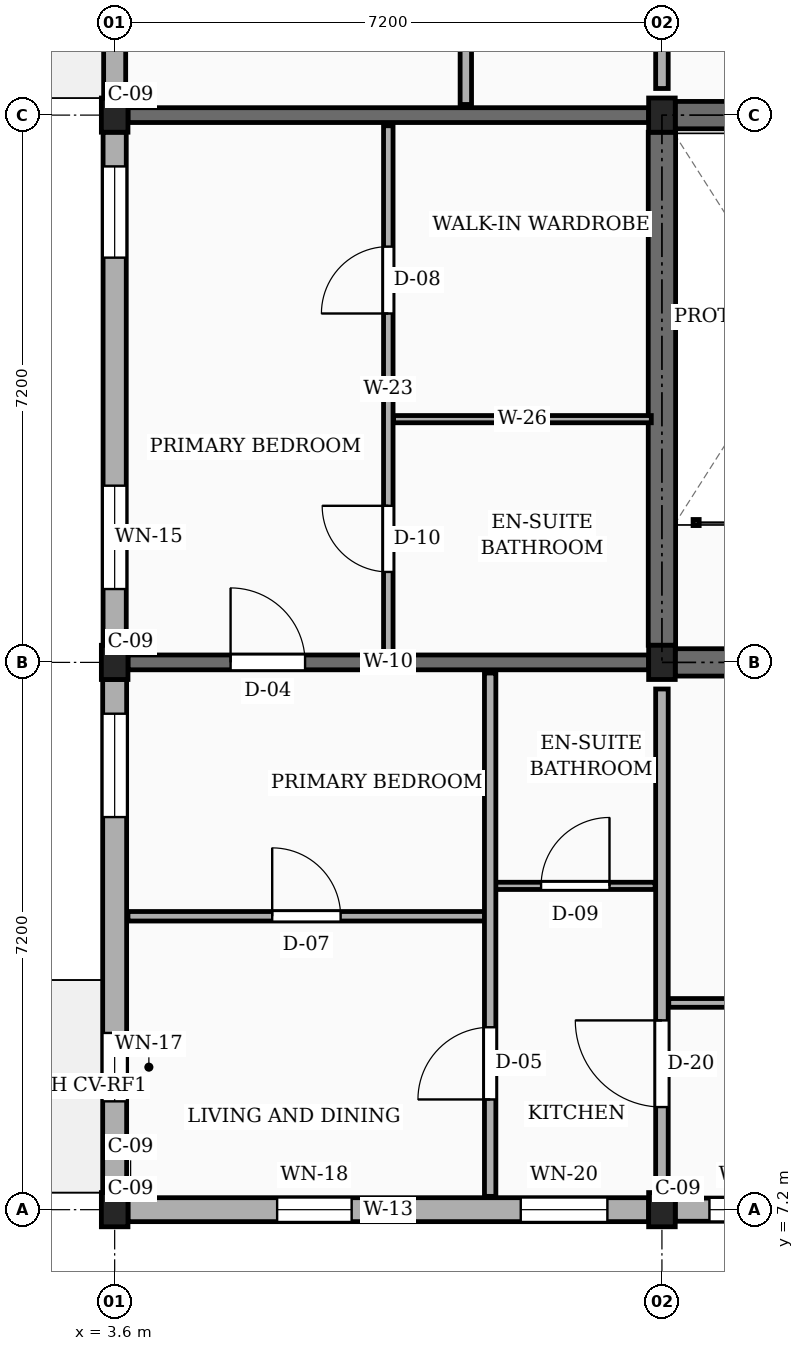
"""IFC4 building model, lengths in metres.
Left out: names, types, materials, properties, quantities, classifications, styles, units other than length and angle.
Written with IfcOpenShell. Run it as: python <this file> out.ifc"""

import sys

from ifc_helpers import new_model, si_unit, direction, frame, frame_2d, origin, origin_2d, place, context, subcontext, project, spatial, rectangle, extrude, element, fill, save


model = new_model("IFC4")
c1 = context("Model", 3, precision=1e-05, world=origin(), true_north=direction((0.0, 1.0)))
c2 = subcontext(c1, "Body", "Model", "MODEL_VIEW")
j1 = project(units=[si_unit("LENGTHUNIT", "METRE"), si_unit("PLANEANGLEUNIT", "RADIAN")], contexts=[c1])
p1 = place(None, origin())
s1 = spatial("IfcSite", under=j1, at=p1, CompositionType="ELEMENT")
p2 = place(p1, origin())
s2 = spatial("IfcBuilding", under=s1, at=p2, CompositionType="ELEMENT")
p3 = place(p2, frame((0.0, 0.0, 48.6)))
s3 = spatial("IfcBuildingStorey", under=s2, at=p3, CompositionType="ELEMENT", Elevation=48.6)
for number, where, z_axis, x_axis in (
    (1, (3.6, 7.2, 0.0), (0.0, 0.0, 1.0), (1.0, 0.0, 0.0)),
    (2, (3.6, 14.4, 0.0), (0.0, 0.0, 1.0), (1.0, 0.0, 0.0)),
    (3, (3.6, 21.6, 0.0), (0.0, 0.0, 1.0), (1.0, 0.0, 0.0)),
    (4, (10.8, 7.2, 0.0), (0.0, 0.0, 1.0), (1.0, 0.0, 0.0)),
    (5, (10.8, 14.4, 0.0), (0.0, 0.0, 1.0), (1.0, 0.0, 0.0)),
    (6, (10.8, 21.6, 0.0), (0.0, 0.0, 1.0), (1.0, 0.0, 0.0)),
):
    element("IfcColumn", number, at=place(p3, frame(where, z_axis=z_axis, x_axis=x_axis)), inside=s3, PredefinedType="COLUMN", context=c2, shape_type="SweptSolid", body=[
        extrude(rectangle(XDim=0.35, YDim=0.45, at=origin_2d()), origin(), (0.0, 0.0, 1.0), 3.15),
    ])
p4 = place(p3, frame((3.775, 14.4, 0.0), z_axis=(0.0, 0.0, 1.0), x_axis=(1.0, 0.0, 0.0)))
e7 = element("IfcWall", 7, at=p4, inside=s3, PredefinedType="SOLIDWALL", context=c2, shape_type="SweptSolid", body=[
    extrude(rectangle(XDim=6.85, YDim=0.195, at=frame_2d((3.425, 0.0))), origin(), (0.0, 0.0, 1.0), 2.22),
])
p5 = place(p4, frame((1.35, 0.0, 0.0)))
e8 = element("IfcOpeningElement", 8, at=p5, cuts=e7, PredefinedType="OPENING", context=c2, shape_type="SweptSolid", body=[
    extrude(rectangle(XDim=0.98, YDim=2.12, at=frame_2d((0.49, 1.06))), frame((0.0, 0.107, 0.0), z_axis=(0.0, -1.0, 0.0), x_axis=(1.0, 0.0, 0.0)), (0.0, 0.0, 1.0), 0.215),
])
p6 = place(p3, frame((3.775, 21.6, 0.0), z_axis=(0.0, 0.0, 1.0), x_axis=(1.0, 0.0, 0.0)))
e9 = element("IfcWall", 9, at=p6, inside=s3, PredefinedType="SOLIDWALL", context=c2, shape_type="SweptSolid", body=[
    extrude(rectangle(XDim=6.85, YDim=0.195, at=frame_2d((3.425, 0.0))), origin(), (0.0, 0.0, 1.0), 2.22),
])
p7 = place(p3, frame((3.775, 7.2, 0.0), z_axis=(0.0, 0.0, 1.0), x_axis=(1.0, 0.0, 0.0)))
e10 = element("IfcWall", 10, at=p7, inside=s3, PredefinedType="SOLIDWALL", context=c2, shape_type="SweptSolid", body=[
    extrude(rectangle(XDim=6.85, YDim=0.315, at=frame_2d((3.425, 0.0))), origin(), (0.0, 0.0, 1.0), 2.46),
])
p8 = place(p7, frame((1.962, 0.0, 0.78)))
e11 = element("IfcOpeningElement", 11, at=p8, cuts=e10, PredefinedType="OPENING", context=c2, shape_type="SweptSolid", body=[
    extrude(rectangle(XDim=0.98, YDim=1.36, at=frame_2d((0.49, 0.68))), frame((0.0, 0.167, 0.0), z_axis=(0.0, -1.0, 0.0), x_axis=(1.0, 0.0, 0.0)), (0.0, 0.0, 1.0), 0.335),
])
p9 = place(p7, frame((5.167, 0.0, 0.78)))
e12 = element("IfcOpeningElement", 12, at=p9, cuts=e10, PredefinedType="OPENING", context=c2, shape_type="SweptSolid", body=[
    extrude(rectangle(XDim=1.14, YDim=1.36, at=frame_2d((0.57, 0.68))), frame((0.0, 0.167, 0.0), z_axis=(0.0, -1.0, 0.0), x_axis=(1.0, 0.0, 0.0)), (0.0, 0.0, 1.0), 0.335),
])
p10 = place(p3, frame((10.975, 7.2, 0.0), z_axis=(0.0, 0.0, 1.0), x_axis=(1.0, 0.0, 0.0)))
e13 = element("IfcWall", 13, at=p10, inside=s3, PredefinedType="SOLIDWALL", context=c2, shape_type="SweptSolid", body=[
    extrude(rectangle(XDim=6.85, YDim=0.305, at=frame_2d((3.425, 0.0))), origin(), (0.0, 0.0, 1.0), 2.46),
])
p11 = place(p10, frame((0.45, 0.0, 0.78)))
e14 = element("IfcOpeningElement", 14, at=p11, cuts=e13, PredefinedType="OPENING", context=c2, shape_type="SweptSolid", body=[
    extrude(rectangle(XDim=1.14, YDim=1.36, at=frame_2d((0.57, 0.68))), frame((0.0, 0.163, 0.0), z_axis=(0.0, -1.0, 0.0), x_axis=(1.0, 0.0, 0.0)), (0.0, 0.0, 1.0), 0.325),
])
p12 = place(p10, frame((4.65, 0.0, 0.78)))
e15 = element("IfcOpeningElement", 15, at=p12, cuts=e13, PredefinedType="OPENING", context=c2, shape_type="SweptSolid", body=[
    extrude(rectangle(XDim=1.3, YDim=1.36, at=frame_2d((0.65, 0.68))), frame((0.0, 0.163, 0.0), z_axis=(0.0, -1.0, 0.0), x_axis=(1.0, 0.0, 0.0)), (0.0, 0.0, 1.0), 0.325),
])
p13 = place(p3, frame((3.6, 28.575, 0.0), z_axis=(0.0, 0.0, 1.0), x_axis=(0.0, -1.0, 0.0)))
e16 = element("IfcWall", 16, at=p13, inside=s3, PredefinedType="SOLIDWALL", context=c2, shape_type="SweptSolid", body=[
    extrude(rectangle(XDim=6.75, YDim=0.29, at=frame_2d((3.375, 0.0))), origin(), (0.0, 0.0, 1.0), 2.46),
])
p14 = place(p13, frame((0.45, 0.0, 0.78)))
e17 = element("IfcOpeningElement", 17, at=p14, cuts=e16, PredefinedType="OPENING", context=c2, shape_type="SweptSolid", body=[
    extrude(rectangle(XDim=1.04, YDim=1.26, at=frame_2d((0.52, 0.63))), frame((0.0, 0.155, 0.0), z_axis=(0.0, -1.0, 0.0), x_axis=(1.0, 0.0, 0.0)), (0.0, 0.0, 1.0), 0.31),
])
p15 = place(p13, frame((4.65, 0.0, 0.78)))
e18 = element("IfcOpeningElement", 18, at=p15, cuts=e16, PredefinedType="OPENING", context=c2, shape_type="SweptSolid", body=[
    extrude(rectangle(XDim=1.2, YDim=1.26, at=frame_2d((0.6, 0.63))), frame((0.0, 0.155, 0.0), z_axis=(0.0, -1.0, 0.0), x_axis=(1.0, 0.0, 0.0)), (0.0, 0.0, 1.0), 0.31),
])
p16 = place(p3, frame((3.6, 21.375, 0.0), z_axis=(0.0, 0.0, 1.0), x_axis=(0.0, -1.0, 0.0)))
e19 = element("IfcWall", 19, at=p16, inside=s3, PredefinedType="SOLIDWALL", context=c2, shape_type="SweptSolid", body=[
    extrude(rectangle(XDim=6.75, YDim=0.305, at=frame_2d((3.375, 0.0))), origin(), (0.0, 0.0, 1.0), 2.46),
])
p17 = place(p16, frame((0.45, 0.0, 0.78)))
e20 = element("IfcOpeningElement", 20, at=p17, cuts=e19, PredefinedType="OPENING", context=c2, shape_type="SweptSolid", body=[
    extrude(rectangle(XDim=1.2, YDim=1.26, at=frame_2d((0.6, 0.63))), frame((0.0, 0.163, 0.0), z_axis=(0.0, -1.0, 0.0), x_axis=(1.0, 0.0, 0.0)), (0.0, 0.0, 1.0), 0.325),
])
p18 = place(p16, frame((4.65, 0.0, 0.78)))
e21 = element("IfcOpeningElement", 21, at=p18, cuts=e19, PredefinedType="OPENING", context=c2, shape_type="SweptSolid", body=[
    extrude(rectangle(XDim=1.36, YDim=1.26, at=frame_2d((0.68, 0.63))), frame((0.0, 0.163, 0.0), z_axis=(0.0, -1.0, 0.0), x_axis=(1.0, 0.0, 0.0)), (0.0, 0.0, 1.0), 0.325),
])
p19 = place(p3, frame((3.6, 14.175, 0.0), z_axis=(0.0, 0.0, 1.0), x_axis=(0.0, -1.0, 0.0)))
e22 = element("IfcWall", 22, at=p19, inside=s3, PredefinedType="SOLIDWALL", context=c2, shape_type="SweptSolid", body=[
    extrude(rectangle(XDim=6.75, YDim=0.315, at=frame_2d((3.375, 0.0))), origin(), (0.0, 0.0, 1.0), 2.46),
])
p20 = place(p19, frame((0.45, 0.0, 0.78)))
e23 = element("IfcOpeningElement", 23, at=p20, cuts=e22, PredefinedType="OPENING", context=c2, shape_type="SweptSolid", body=[
    extrude(rectangle(XDim=1.36, YDim=1.26, at=frame_2d((0.68, 0.63))), frame((0.0, 0.167, 0.0), z_axis=(0.0, -1.0, 0.0), x_axis=(1.0, 0.0, 0.0)), (0.0, 0.0, 1.0), 0.335),
])
p21 = place(p19, frame((4.65, 0.0, 0.78)))
e24 = element("IfcOpeningElement", 24, at=p21, cuts=e22, PredefinedType="OPENING", context=c2, shape_type="SweptSolid", body=[
    extrude(rectangle(XDim=0.9, YDim=1.36, at=frame_2d((0.45, 0.68))), frame((0.0, 0.167, 0.0), z_axis=(0.0, -1.0, 0.0), x_axis=(1.0, 0.0, 0.0)), (0.0, 0.0, 1.0), 0.335),
])
p22 = place(p3, frame((10.8, 14.625, 0.0), z_axis=(0.0, 0.0, 1.0), x_axis=(0.0, 1.0, 0.0)))
e25 = element("IfcWall", 25, at=p22, inside=s3, PredefinedType="SHEAR", context=c2, shape_type="SweptSolid", body=[
    extrude(rectangle(XDim=6.75, YDim=0.36, at=frame_2d((3.375, 0.0))), origin(), (0.0, 0.0, 1.0), 2.89),
])
for number, where, z_axis, x_axis in (
    (26, (10.975, 21.6, 0.0), (0.0, 0.0, 1.0), (1.0, 0.0, 0.0)),
    (27, (10.975, 14.4, 0.0), (0.0, 0.0, 1.0), (1.0, 0.0, 0.0)),
):
    element("IfcWall", number, at=place(p3, frame(where, z_axis=z_axis, x_axis=x_axis)), inside=s3, PredefinedType="SHEAR", context=c2, shape_type="SweptSolid", body=[
        extrude(rectangle(XDim=6.85, YDim=0.36, at=frame_2d((3.425, 0.0))), origin(), (0.0, 0.0, 1.0), 2.89),
    ])
p23 = place(p3, frame((10.8, 7.55, 0.0), z_axis=(0.0, 0.0, 1.0), x_axis=(0.0, 1.0, 0.0)))
e28 = element("IfcWall", 28, at=p23, inside=s3, PredefinedType="PARTITIONING", context=c2, shape_type="SweptSolid", body=[
    extrude(rectangle(XDim=6.5, YDim=0.165, at=frame_2d((3.25, 0.0))), origin(), (0.0, 0.0, 1.0), 2.325),
])
p24 = place(p23, frame((1.0, 0.0, 0.0)))
e29 = element("IfcOpeningElement", 29, at=p24, cuts=e28, PredefinedType="OPENING", context=c2, shape_type="SweptSolid", body=[
    extrude(rectangle(XDim=1.14, YDim=2.18, at=frame_2d((0.57, 1.09))), frame((0.0, 0.093, 0.0), z_axis=(0.0, -1.0, 0.0), x_axis=(1.0, 0.0, 0.0)), (0.0, 0.0, 1.0), 0.185),
])
p25 = place(p3, frame((10.8, 21.95, 0.0), z_axis=(0.0, 0.0, 1.0), x_axis=(0.0, 1.0, 0.0)))
e30 = element("IfcWall", 30, at=p25, inside=s3, PredefinedType="PARTITIONING", context=c2, shape_type="SweptSolid", body=[
    extrude(rectangle(XDim=6.5, YDim=0.165, at=frame_2d((3.25, 0.0))), origin(), (0.0, 0.0, 1.0), 2.325),
])
p26 = place(p25, frame((1.0, 0.0, 0.0)))
e31 = element("IfcOpeningElement", 31, at=p26, cuts=e30, PredefinedType="OPENING", context=c2, shape_type="SweptSolid", body=[
    extrude(rectangle(XDim=1.0, YDim=2.15, at=frame_2d((0.5, 1.075))), frame((0.0, 0.093, 0.0), z_axis=(0.0, -1.0, 0.0), x_axis=(1.0, 0.0, 0.0)), (0.0, 0.0, 1.0), 0.185),
])
p27 = place(p3, frame((10.89, 9.92, 0.0), z_axis=(0.0, 0.0, 1.0), x_axis=(1.0, 0.0, 0.0)))
e32 = element("IfcWall", 32, at=p27, inside=s3, PredefinedType="PARTITIONING", context=c2, shape_type="SweptSolid", body=[
    extrude(rectangle(XDim=7.02, YDim=0.115, at=frame_2d((3.51, 0.0))), origin(), (0.0, 0.0, 1.0), 2.325),
])
p28 = place(p27, frame((2.85, 0.0, 0.0)))
e33 = element("IfcOpeningElement", 33, at=p28, cuts=e32, PredefinedType="OPENING", context=c2, shape_type="SweptSolid", body=[
    extrude(rectangle(XDim=1.02, YDim=2.15, at=frame_2d((0.51, 1.075))), frame((0.0, 0.067, 0.0), z_axis=(0.0, -1.0, 0.0), x_axis=(1.0, 0.0, 0.0)), (0.0, 0.0, 1.0), 0.135),
])
p29 = place(p3, frame((3.775, 11.06, 0.0), z_axis=(0.0, 0.0, 1.0), x_axis=(1.0, 0.0, 0.0)))
e34 = element("IfcWall", 34, at=p29, inside=s3, PredefinedType="PARTITIONING", context=c2, shape_type="SweptSolid", body=[
    extrude(rectangle(XDim=4.695, YDim=0.125, at=frame_2d((2.348, 0.0))), origin(), (0.0, 0.0, 1.0), 2.325),
])
p30 = place(p29, frame((1.897, 0.0, 0.0)))
e35 = element("IfcOpeningElement", 35, at=p30, cuts=e34, PredefinedType="OPENING", context=c2, shape_type="SweptSolid", body=[
    extrude(rectangle(XDim=0.9, YDim=2.1, at=frame_2d((0.45, 1.05))), frame((0.0, 0.073, 0.0), z_axis=(0.0, -1.0, 0.0), x_axis=(1.0, 0.0, 0.0)), (0.0, 0.0, 1.0), 0.145),
])
p31 = place(p3, frame((8.61, 11.46, 0.0), z_axis=(0.0, 0.0, 1.0), x_axis=(1.0, 0.0, 0.0)))
e36 = element("IfcWall", 36, at=p31, inside=s3, PredefinedType="PARTITIONING", context=c2, shape_type="SweptSolid", body=[
    extrude(rectangle(XDim=2.1, YDim=0.095, at=frame_2d((1.05, 0.0))), origin(), (0.0, 0.0, 1.0), 2.325),
])
p32 = place(p31, frame((0.6, 0.0, 0.0)))
e37 = element("IfcOpeningElement", 37, at=p32, cuts=e36, PredefinedType="OPENING", context=c2, shape_type="SweptSolid", body=[
    extrude(rectangle(XDim=0.9, YDim=2.05, at=frame_2d((0.45, 1.025))), frame((0.0, 0.058, 0.0), z_axis=(0.0, -1.0, 0.0), x_axis=(1.0, 0.0, 0.0)), (0.0, 0.0, 1.0), 0.115),
])
p33 = place(p3, frame((8.54, 7.375, 0.0), z_axis=(0.0, 0.0, 1.0), x_axis=(0.0, 1.0, 0.0)))
e38 = element("IfcWall", 38, at=p33, inside=s3, PredefinedType="PARTITIONING", context=c2, shape_type="SweptSolid", body=[
    extrude(rectangle(XDim=6.885, YDim=0.15, at=frame_2d((3.442, 0.0))), origin(), (0.0, 0.0, 1.0), 2.325),
])
p34 = place(p33, frame((1.275, 0.0, 0.0)))
e39 = element("IfcOpeningElement", 39, at=p34, cuts=e38, PredefinedType="OPENING", context=c2, shape_type="SweptSolid", body=[
    extrude(rectangle(XDim=0.95, YDim=2.1, at=frame_2d((0.475, 1.05))), frame((0.0, 0.085, 0.0), z_axis=(0.0, -1.0, 0.0), x_axis=(1.0, 0.0, 0.0)), (0.0, 0.0, 1.0), 0.17),
])
p35 = place(p3, frame((7.2, 14.54, 0.0), z_axis=(0.0, 0.0, 1.0), x_axis=(0.0, 1.0, 0.0)))
e40 = element("IfcWall", 40, at=p35, inside=s3, PredefinedType="PARTITIONING", context=c2, shape_type="SweptSolid", body=[
    extrude(rectangle(XDim=6.92, YDim=0.125, at=frame_2d((3.46, 0.0))), origin(), (0.0, 0.0, 1.0), 2.325),
])
p36 = place(p35, frame((1.05, 0.0, 0.0)))
e41 = element("IfcOpeningElement", 41, at=p36, cuts=e40, PredefinedType="OPENING", context=c2, shape_type="SweptSolid", body=[
    extrude(rectangle(XDim=0.87, YDim=2.05, at=frame_2d((0.435, 1.025))), frame((0.0, 0.073, 0.0), z_axis=(0.0, -1.0, 0.0), x_axis=(1.0, 0.0, 0.0)), (0.0, 0.0, 1.0), 0.145),
])
p37 = place(p35, frame((4.45, 0.0, 0.0)))
e42 = element("IfcOpeningElement", 42, at=p37, cuts=e40, PredefinedType="OPENING", context=c2, shape_type="SweptSolid", body=[
    extrude(rectangle(XDim=0.88, YDim=2.08, at=frame_2d((0.44, 1.04))), frame((0.0, 0.073, 0.0), z_axis=(0.0, -1.0, 0.0), x_axis=(1.0, 0.0, 0.0)), (0.0, 0.0, 1.0), 0.145),
])
p38 = place(p3, frame((7.27, 17.6, 0.0), z_axis=(0.0, 0.0, 1.0), x_axis=(1.0, 0.0, 0.0)))
e43 = element("IfcWall", 43, at=p38, inside=s3, PredefinedType="PARTITIONING", context=c2, shape_type="SweptSolid", body=[
    extrude(rectangle(XDim=3.39, YDim=0.095, at=frame_2d((1.695, 0.0))), origin(), (0.0, 0.0, 1.0), 2.325),
])
p39 = place(p3, frame((8.22, 21.74, 0.0), z_axis=(0.0, 0.0, 1.0), x_axis=(0.0, 1.0, 0.0)))
e44 = element("IfcWall", 44, at=p39, inside=s3, PredefinedType="PARTITIONING", context=c2, shape_type="SweptSolid", body=[
    extrude(rectangle(XDim=6.92, YDim=0.15, at=frame_2d((3.46, 0.0))), origin(), (0.0, 0.0, 1.0), 2.325),
])
p40 = place(p39, frame((1.31, 0.0, 0.0)))
e45 = element("IfcOpeningElement", 45, at=p40, cuts=e44, PredefinedType="OPENING", context=c2, shape_type="SweptSolid", body=[
    extrude(rectangle(XDim=0.95, YDim=2.1, at=frame_2d((0.475, 1.05))), frame((0.0, 0.085, 0.0), z_axis=(0.0, -1.0, 0.0), x_axis=(1.0, 0.0, 0.0)), (0.0, 0.0, 1.0), 0.17),
])
p41 = place(p8, origin())
e46 = element("IfcWindow", 46, at=p41, inside=s3, PartitioningType="SINGLE_PANEL", PredefinedType="WINDOW", context=c2, shape_type="SweptSolid", body=[
    extrude(rectangle(XDim=0.98, YDim=1.36, at=frame_2d((0.49, 0.68))), frame((0.0, 0.03, 0.0), z_axis=(0.0, -1.0, 0.0), x_axis=(1.0, 0.0, 0.0)), (0.0, 0.0, 1.0), 0.06),
])
fill(e11, e46)
p42 = place(p9, origin())
e47 = element("IfcWindow", 47, at=p42, inside=s3, PartitioningType="SINGLE_PANEL", PredefinedType="WINDOW", context=c2, shape_type="SweptSolid", body=[
    extrude(rectangle(XDim=1.14, YDim=1.36, at=frame_2d((0.57, 0.68))), frame((0.0, 0.03, 0.0), z_axis=(0.0, -1.0, 0.0), x_axis=(1.0, 0.0, 0.0)), (0.0, 0.0, 1.0), 0.06),
])
fill(e12, e47)
p43 = place(p11, origin())
e48 = element("IfcWindow", 48, at=p43, inside=s3, PartitioningType="SINGLE_PANEL", PredefinedType="WINDOW", context=c2, shape_type="SweptSolid", body=[
    extrude(rectangle(XDim=1.14, YDim=1.36, at=frame_2d((0.57, 0.68))), frame((0.0, 0.03, 0.0), z_axis=(0.0, -1.0, 0.0), x_axis=(1.0, 0.0, 0.0)), (0.0, 0.0, 1.0), 0.06),
])
fill(e14, e48)
p44 = place(p17, origin())
e49 = element("IfcWindow", 49, at=p44, inside=s3, PartitioningType="SINGLE_PANEL", PredefinedType="WINDOW", context=c2, shape_type="SweptSolid", body=[
    extrude(rectangle(XDim=1.2, YDim=1.26, at=frame_2d((0.6, 0.63))), frame((0.0, 0.03, 0.0), z_axis=(0.0, -1.0, 0.0), x_axis=(1.0, 0.0, 0.0)), (0.0, 0.0, 1.0), 0.06),
])
fill(e20, e49)
p45 = place(p18, origin())
e50 = element("IfcWindow", 50, at=p45, inside=s3, PartitioningType="SINGLE_PANEL", PredefinedType="WINDOW", context=c2, shape_type="SweptSolid", body=[
    extrude(rectangle(XDim=1.36, YDim=1.26, at=frame_2d((0.68, 0.63))), frame((0.0, 0.03, 0.0), z_axis=(0.0, -1.0, 0.0), x_axis=(1.0, 0.0, 0.0)), (0.0, 0.0, 1.0), 0.06),
])
fill(e21, e50)
p46 = place(p20, origin())
e51 = element("IfcWindow", 51, at=p46, inside=s3, PartitioningType="SINGLE_PANEL", PredefinedType="WINDOW", context=c2, shape_type="SweptSolid", body=[
    extrude(rectangle(XDim=1.36, YDim=1.26, at=frame_2d((0.68, 0.63))), frame((0.0, 0.03, 0.0), z_axis=(0.0, -1.0, 0.0), x_axis=(1.0, 0.0, 0.0)), (0.0, 0.0, 1.0), 0.06),
])
fill(e23, e51)
p47 = place(p21, origin())
e52 = element("IfcWindow", 52, at=p47, inside=s3, PartitioningType="SINGLE_PANEL", PredefinedType="WINDOW", context=c2, shape_type="SweptSolid", body=[
    extrude(rectangle(XDim=0.9, YDim=1.36, at=frame_2d((0.45, 0.68))), frame((0.0, 0.03, 0.0), z_axis=(0.0, -1.0, 0.0), x_axis=(1.0, 0.0, 0.0)), (0.0, 0.0, 1.0), 0.06),
])
fill(e24, e52)
p48 = place(p24, origin())
e53 = element("IfcDoor", 53, at=p48, inside=s3, OperationType="SINGLE_SWING_RIGHT", PredefinedType="DOOR", context=c2, shape_type="SweptSolid", body=[
    extrude(rectangle(XDim=1.14, YDim=2.18, at=frame_2d((0.57, 1.09))), frame((0.0, 0.025, 0.0), z_axis=(0.0, -1.0, 0.0), x_axis=(1.0, 0.0, 0.0)), (0.0, 0.0, 1.0), 0.05),
])
fill(e29, e53)
p49 = place(p30, origin())
e54 = element("IfcDoor", 54, at=p49, inside=s3, OperationType="SINGLE_SWING_LEFT", PredefinedType="DOOR", context=c2, shape_type="SweptSolid", body=[
    extrude(rectangle(XDim=0.9, YDim=2.1, at=frame_2d((0.45, 1.05))), frame((0.0, 0.025, 0.0), z_axis=(0.0, -1.0, 0.0), x_axis=(1.0, 0.0, 0.0)), (0.0, 0.0, 1.0), 0.05),
])
fill(e35, e54)
p50 = place(p32, origin())
e55 = element("IfcDoor", 55, at=p50, inside=s3, OperationType="SINGLE_SWING_RIGHT", PredefinedType="DOOR", context=c2, shape_type="SweptSolid", body=[
    extrude(rectangle(XDim=0.9, YDim=2.05, at=frame_2d((0.45, 1.025))), frame((0.0, 0.025, 0.0), z_axis=(0.0, -1.0, 0.0), x_axis=(1.0, 0.0, 0.0)), (0.0, 0.0, 1.0), 0.05),
])
fill(e37, e55)
p51 = place(p34, origin())
e56 = element("IfcDoor", 56, at=p51, inside=s3, OperationType="SINGLE_SWING_LEFT", PredefinedType="DOOR", context=c2, shape_type="SweptSolid", body=[
    extrude(rectangle(XDim=0.95, YDim=2.1, at=frame_2d((0.475, 1.05))), frame((0.0, 0.025, 0.0), z_axis=(0.0, -1.0, 0.0), x_axis=(1.0, 0.0, 0.0)), (0.0, 0.0, 1.0), 0.05),
])
fill(e39, e56)
p52 = place(p36, origin())
e57 = element("IfcDoor", 57, at=p52, inside=s3, OperationType="SINGLE_SWING_RIGHT", PredefinedType="DOOR", context=c2, shape_type="SweptSolid", body=[
    extrude(rectangle(XDim=0.87, YDim=2.05, at=frame_2d((0.435, 1.025))), frame((0.0, 0.025, 0.0), z_axis=(0.0, -1.0, 0.0), x_axis=(1.0, 0.0, 0.0)), (0.0, 0.0, 1.0), 0.05),
])
fill(e41, e57)
p53 = place(p37, origin())
e58 = element("IfcDoor", 58, at=p53, inside=s3, OperationType="SINGLE_SWING_LEFT", PredefinedType="DOOR", context=c2, shape_type="SweptSolid", body=[
    extrude(rectangle(XDim=0.88, YDim=2.08, at=frame_2d((0.44, 1.04))), frame((0.0, 0.025, 0.0), z_axis=(0.0, -1.0, 0.0), x_axis=(1.0, 0.0, 0.0)), (0.0, 0.0, 1.0), 0.05),
])
fill(e42, e58)
p54 = place(p5, origin())
e59 = element("IfcDoor", 59, at=p54, inside=s3, OperationType="SINGLE_SWING_LEFT", PredefinedType="DOOR", context=c2, shape_type="SweptSolid", body=[
    extrude(rectangle(XDim=0.98, YDim=2.12, at=frame_2d((0.49, 1.06))), frame((0.0, 0.025, 0.0), z_axis=(0.0, -1.0, 0.0), x_axis=(1.0, 0.0, 0.0)), (0.0, 0.0, 1.0), 0.05),
])
fill(e8, e59)
save(model, sys.argv[1])
